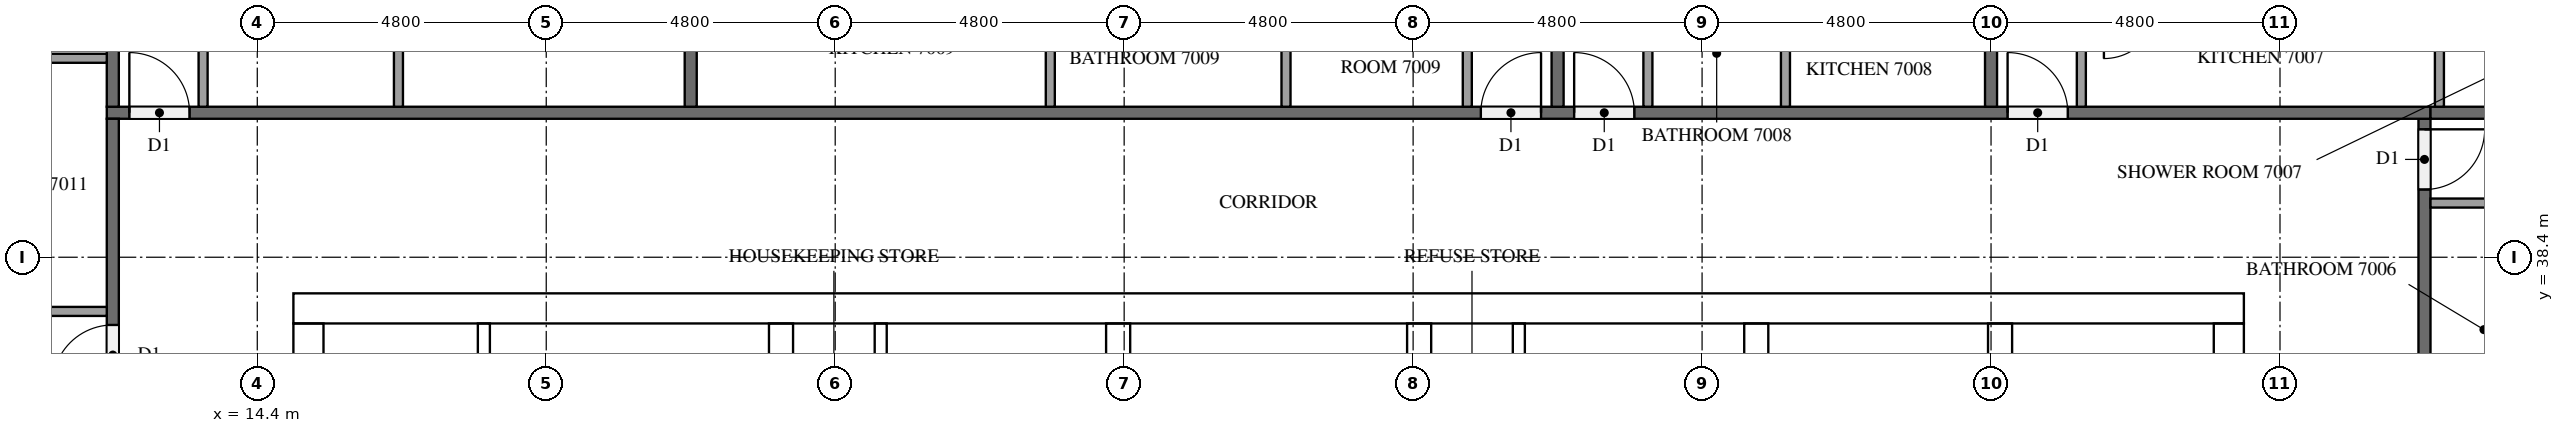
"""IFC4 building model, lengths in metres.
Left out: names, types, materials, properties, quantities, classifications, styles, units other than length and angle.
Written with IfcOpenShell. Run it as: python <this file> out.ifc"""

import sys

from ifc_helpers import new_model, si_unit, direction, frame, frame_2d, origin, place, context, subcontext, project, spatial, rectangle, extrude, element, fill, save


model = new_model("IFC4")
c1 = context("Model", 3, precision=1e-05, world=origin(), true_north=direction((0.0, 1.0)))
c2 = subcontext(c1, "Body", "Model", "MODEL_VIEW")
j1 = project(units=[si_unit("LENGTHUNIT", "METRE"), si_unit("PLANEANGLEUNIT", "RADIAN")], contexts=[c1])
p1 = place(None, origin())
s1 = spatial("IfcSite", under=j1, at=p1, CompositionType="ELEMENT")
p2 = place(p1, origin())
s2 = spatial("IfcBuilding", under=s1, at=p2, CompositionType="ELEMENT")
p3 = place(p2, frame((0.0, 0.0, 268.6)))
s3 = spatial("IfcBuildingStorey", under=s2, at=p3, CompositionType="ELEMENT", Elevation=268.6)
p4 = place(p3, frame((15.0, 37.55, 0.0), z_axis=(0.0, 0.0, 1.0), x_axis=(1.0, 0.0, 0.0)))
e1 = element("IfcWall", 1, at=p4, inside=s3, PredefinedType="SHEAR", context=c2, shape_type="SweptSolid", body=[
    extrude(rectangle(XDim=32.4, YDim=0.5, at=frame_2d((16.2, 0.0))), origin(), (0.0, 0.0, 1.0), 3.2),
])
p5 = place(p4, frame((15.3, 0.0, 0.0)))
e2 = element("IfcOpeningElement", 2, at=p5, cuts=e1, PredefinedType="OPENING", context=c2, shape_type="SweptSolid", body=[
    extrude(rectangle(XDim=1.8, YDim=2.1, at=frame_2d((0.9, 1.05))), frame((0.0, 0.26, 0.0), z_axis=(0.0, -1.0, 0.0), x_axis=(1.0, 0.0, 0.0)), (0.0, 0.0, 1.0), 0.52),
])
p6 = place(p4, frame((1.282, 0.0, 0.0)))
e3 = element("IfcOpeningElement", 3, at=p6, cuts=e1, PredefinedType="OPENING", context=c2, shape_type="SweptSolid", body=[
    extrude(rectangle(XDim=1.0, YDim=2.1, at=frame_2d((0.5, 1.05))), frame((0.0, 0.26, 0.0), z_axis=(0.0, -1.0, 0.0), x_axis=(1.0, 0.0, 0.0)), (0.0, 0.0, 1.0), 0.52),
])
p7 = place(p4, frame((5.082, 0.0, 0.0)))
e4 = element("IfcOpeningElement", 4, at=p7, cuts=e1, PredefinedType="OPENING", context=c2, shape_type="SweptSolid", body=[
    extrude(rectangle(XDim=1.0, YDim=2.1, at=frame_2d((0.5, 1.05))), frame((0.0, 0.26, 0.0), z_axis=(0.0, -1.0, 0.0), x_axis=(1.0, 0.0, 0.0)), (0.0, 0.0, 1.0), 0.52),
])
p8 = place(p3, frame((15.25, 15.5, 0.0), z_axis=(0.0, 0.0, 1.0), x_axis=(0.0, 1.0, 0.0)))
e5 = element("IfcWall", 5, at=p8, inside=s3, PredefinedType="SHEAR", context=c2, shape_type="SweptSolid", body=[
    extrude(rectangle(XDim=21.8, YDim=0.5, at=frame_2d((10.9, 0.0))), origin(), (0.0, 0.0, 1.0), 3.2),
])
p9 = place(p8, frame((5.26, 0.0, 0.0)))
e6 = element("IfcOpeningElement", 6, at=p9, cuts=e5, PredefinedType="OPENING", context=c2, shape_type="SweptSolid", body=[
    extrude(rectangle(XDim=1.2, YDim=2.1, at=frame_2d((0.6, 1.05))), frame((0.0, 0.26, 0.0), z_axis=(0.0, -1.0, 0.0), x_axis=(1.0, 0.0, 0.0)), (0.0, 0.0, 1.0), 0.52),
])
p10 = place(p3, frame((47.15, 15.5, 0.0), z_axis=(0.0, 0.0, 1.0), x_axis=(0.0, 1.0, 0.0)))
e7 = element("IfcWall", 7, at=p10, inside=s3, PredefinedType="SHEAR", context=c2, shape_type="SweptSolid", body=[
    extrude(rectangle(XDim=21.8, YDim=0.5, at=frame_2d((10.9, 0.0))), origin(), (0.0, 0.0, 1.0), 3.2),
])
p11 = place(p10, frame((10.6, 0.0, 0.0)))
e8 = element("IfcOpeningElement", 8, at=p11, cuts=e7, PredefinedType="OPENING", context=c2, shape_type="SweptSolid", body=[
    extrude(rectangle(XDim=1.2, YDim=2.1, at=frame_2d((0.6, 1.05))), frame((0.0, 0.26, 0.0), z_axis=(0.0, -1.0, 0.0), x_axis=(1.0, 0.0, 0.0)), (0.0, 0.0, 1.0), 0.52),
])
p12 = place(p3, frame((23.1, 15.5, 0.0), z_axis=(0.0, 0.0, 1.0), x_axis=(0.0, 1.0, 0.0)))
e9 = element("IfcWall", 9, at=p12, inside=s3, PredefinedType="SHEAR", context=c2, shape_type="SweptSolid", body=[
    extrude(rectangle(XDim=21.8, YDim=0.4, at=frame_2d((10.9, 0.0))), origin(), (0.0, 0.0, 1.0), 3.2),
])
p13 = place(p3, frame((39.3, 27.75, 0.0), z_axis=(0.0, 0.0, 1.0), x_axis=(0.0, 1.0, 0.0)))
e10 = element("IfcWall", 10, at=p13, inside=s3, PredefinedType="SHEAR", context=c2, shape_type="SweptSolid", body=[
    extrude(rectangle(XDim=9.55, YDim=0.4, at=frame_2d((4.775, 0.0))), origin(), (0.0, 0.0, 1.0), 3.2),
])
p14 = place(p3, frame((43.35, 27.75, 0.0), z_axis=(0.0, 0.0, 1.0), x_axis=(0.0, 1.0, 0.0)))
e11 = element("IfcWall", 11, at=p14, inside=s3, PredefinedType="SHEAR", context=c2, shape_type="SweptSolid", body=[
    extrude(rectangle(XDim=9.55, YDim=0.4, at=frame_2d((4.775, 0.0))), origin(), (0.0, 0.0, 1.0), 3.2),
])
p15 = place(p14, frame((7.65, 0.0, 0.0)))
e12 = element("IfcOpeningElement", 12, at=p15, cuts=e11, PredefinedType="OPENING", context=c2, shape_type="SweptSolid", body=[
    extrude(rectangle(XDim=1.2, YDim=2.1, at=frame_2d((0.6, 1.05))), frame((0.0, 0.21, 0.0), z_axis=(0.0, -1.0, 0.0), x_axis=(1.0, 0.0, 0.0)), (0.0, 0.0, 1.0), 0.42),
])
for number, where, z_axis, x_axis in (
    (13, (28.7, 33.75, 0.0), (0.0, 0.0, 1.0), (0.0, 1.0, 0.0)),
    (14, (33.7, 33.75, 0.0), (0.0, 0.0, 1.0), (0.0, 1.0, 0.0)),
):
    element("IfcWall", number, at=place(p3, frame(where, z_axis=z_axis, x_axis=x_axis)), inside=s3, PredefinedType="SHEAR", context=c2, shape_type="SweptSolid", body=[
        extrude(rectangle(XDim=3.55, YDim=0.4, at=frame_2d((1.775, 0.0))), origin(), (0.0, 0.0, 1.0), 3.2),
    ])
p16 = place(p3, frame((18.164, 31.45, 0.0), z_axis=(0.0, 0.0, 1.0), x_axis=(0.0, 1.0, 0.0)))
e15 = element("IfcWall", 15, at=p16, inside=s3, PredefinedType="PARTITIONING", context=c2, shape_type="SweptSolid", body=[
    extrude(rectangle(XDim=5.85, YDim=0.2, at=frame_2d((2.925, 0.0))), origin(), (0.0, 0.0, 1.0), 3.2),
])
for number, where, z_axis, x_axis in (
    (16, (24.756, 33.75, 0.0), (0.0, 0.0, 1.0), (0.0, 1.0, 0.0)),
    (17, (35.356, 33.75, 0.0), (0.0, 0.0, 1.0), (0.0, 1.0, 0.0)),
):
    element("IfcWall", number, at=place(p3, frame(where, z_axis=z_axis, x_axis=x_axis)), inside=s3, PredefinedType="PARTITIONING", context=c2, shape_type="SweptSolid", body=[
        extrude(rectangle(XDim=3.55, YDim=0.2, at=frame_2d((1.775, 0.0))), origin(), (0.0, 0.0, 1.0), 3.2),
    ])
p17 = place(p3, frame((50.4, 40.7, 0.0), z_axis=(0.0, 0.0, 1.0), x_axis=(0.0, -1.0, 0.0)))
e18 = element("IfcWall", 18, at=p17, inside=s3, PredefinedType="PARTITIONING", context=c2, shape_type="SweptSolid", body=[
    extrude(rectangle(XDim=28.6, YDim=0.2, at=frame_2d((14.3, 0.0))), origin(), (0.0, 0.0, 1.0), 3.2),
])
p18 = place(p17, frame((27.425, 0.0, 0.0)))
e19 = element("IfcOpeningElement", 19, at=p18, cuts=e18, PredefinedType="OPENING", context=c2, shape_type="SweptSolid", body=[
    extrude(rectangle(XDim=1.0, YDim=2.1, at=frame_2d((0.5, 1.05))), frame((0.0, 0.11, 0.0), z_axis=(0.0, -1.0, 0.0), x_axis=(1.0, 0.0, 0.0)), (0.0, 0.0, 1.0), 0.22),
])
p19 = place(p17, frame((0.175, 0.0, 0.0)))
e20 = element("IfcOpeningElement", 20, at=p19, cuts=e18, PredefinedType="OPENING", context=c2, shape_type="SweptSolid", body=[
    extrude(rectangle(XDim=1.0, YDim=2.1, at=frame_2d((0.5, 1.05))), frame((0.0, 0.11, 0.0), z_axis=(0.0, -1.0, 0.0), x_axis=(1.0, 0.0, 0.0)), (0.0, 0.0, 1.0), 0.22),
])
p20 = place(p3, frame((11.9, 40.8, 0.0), z_axis=(0.0, 0.0, 1.0), x_axis=(1.0, 0.0, 0.0)))
e21 = element("IfcWall", 21, at=p20, inside=s3, PredefinedType="PARTITIONING", context=c2, shape_type="SweptSolid", body=[
    extrude(rectangle(XDim=38.6, YDim=0.2, at=frame_2d((19.3, 0.0))), origin(), (0.0, 0.0, 1.0), 3.2),
])
p21 = place(p20, frame((31.575, 0.0, 0.0)))
e22 = element("IfcOpeningElement", 22, at=p21, cuts=e21, PredefinedType="OPENING", context=c2, shape_type="SweptSolid", body=[
    extrude(rectangle(XDim=1.0, YDim=2.1, at=frame_2d((0.5, 1.05))), frame((0.0, 0.11, 0.0), z_axis=(0.0, -1.0, 0.0), x_axis=(1.0, 0.0, 0.0)), (0.0, 0.0, 1.0), 0.22),
])
p22 = place(p20, frame((24.375, 0.0, 0.0)))
e23 = element("IfcOpeningElement", 23, at=p22, cuts=e21, PredefinedType="OPENING", context=c2, shape_type="SweptSolid", body=[
    extrude(rectangle(XDim=1.0, YDim=2.1, at=frame_2d((0.5, 1.05))), frame((0.0, 0.11, 0.0), z_axis=(0.0, -1.0, 0.0), x_axis=(1.0, 0.0, 0.0)), (0.0, 0.0, 1.0), 0.22),
])
p23 = place(p20, frame((22.825, 0.0, 0.0)))
e24 = element("IfcOpeningElement", 24, at=p23, cuts=e21, PredefinedType="OPENING", context=c2, shape_type="SweptSolid", body=[
    extrude(rectangle(XDim=1.0, YDim=2.1, at=frame_2d((0.5, 1.05))), frame((0.0, 0.11, 0.0), z_axis=(0.0, -1.0, 0.0), x_axis=(1.0, 0.0, 0.0)), (0.0, 0.0, 1.0), 0.22),
])
p24 = place(p20, frame((0.375, 0.0, 0.0)))
e25 = element("IfcOpeningElement", 25, at=p24, cuts=e21, PredefinedType="OPENING", context=c2, shape_type="SweptSolid", body=[
    extrude(rectangle(XDim=1.0, YDim=2.1, at=frame_2d((0.5, 1.05))), frame((0.0, 0.11, 0.0), z_axis=(0.0, -1.0, 0.0), x_axis=(1.0, 0.0, 0.0)), (0.0, 0.0, 1.0), 0.22),
])
p25 = place(p3, frame((12.0, 12.1, 0.0), z_axis=(0.0, 0.0, 1.0), x_axis=(0.0, 1.0, 0.0)))
e26 = element("IfcWall", 26, at=p25, inside=s3, PredefinedType="PARTITIONING", context=c2, shape_type="SweptSolid", body=[
    extrude(rectangle(XDim=28.6, YDim=0.2, at=frame_2d((14.3, 0.0))), origin(), (0.0, 0.0, 1.0), 3.2),
])
p26 = place(p25, frame((24.175, 0.0, 0.0)))
e27 = element("IfcOpeningElement", 27, at=p26, cuts=e26, PredefinedType="OPENING", context=c2, shape_type="SweptSolid", body=[
    extrude(rectangle(XDim=1.0, YDim=2.1, at=frame_2d((0.5, 1.05))), frame((0.0, 0.11, 0.0), z_axis=(0.0, -1.0, 0.0), x_axis=(1.0, 0.0, 0.0)), (0.0, 0.0, 1.0), 0.22),
])
p27 = place(p25, frame((14.575, 0.0, 0.0)))
e28 = element("IfcOpeningElement", 28, at=p27, cuts=e26, PredefinedType="OPENING", context=c2, shape_type="SweptSolid", body=[
    extrude(rectangle(XDim=1.0, YDim=2.1, at=frame_2d((0.5, 1.05))), frame((0.0, 0.11, 0.0), z_axis=(0.0, -1.0, 0.0), x_axis=(1.0, 0.0, 0.0)), (0.0, 0.0, 1.0), 0.22),
])
p28 = place(p25, frame((0.175, 0.0, 0.0)))
e29 = element("IfcOpeningElement", 29, at=p28, cuts=e26, PredefinedType="OPENING", context=c2, shape_type="SweptSolid", body=[
    extrude(rectangle(XDim=1.0, YDim=2.1, at=frame_2d((0.5, 1.05))), frame((0.0, 0.11, 0.0), z_axis=(0.0, -1.0, 0.0), x_axis=(1.0, 0.0, 0.0)), (0.0, 0.0, 1.0), 0.22),
])
p29 = place(p3, frame((50.5, 40.8, 0.0), z_axis=(0.0, 0.0, 1.0), x_axis=(1.0, 0.0, 0.0)))
e30 = element("IfcWall", 30, at=p29, inside=s3, PredefinedType="PARTITIONING", context=c2, shape_type="SweptSolid", body=[
    extrude(rectangle(XDim=7.0, YDim=0.2, at=frame_2d((3.5, 0.0))), origin(), (0.0, 0.0, 1.0), 3.2),
])
p30 = place(p3, frame((43.2, 47.75, 0.0), z_axis=(0.0, 0.0, 1.0), x_axis=(0.0, -1.0, 0.0)))
e31 = element("IfcWall", 31, at=p30, inside=s3, PredefinedType="PARTITIONING", context=c2, shape_type="SweptSolid", body=[
    extrude(rectangle(XDim=6.85, YDim=0.2, at=frame_2d((3.425, 0.0))), origin(), (0.0, 0.0, 1.0), 3.2),
])
for number, where, z_axis, x_axis in (
    (32, (36.0, 47.9, 0.0), (0.0, 0.0, 1.0), (0.0, -1.0, 0.0)),
    (33, (21.6, 47.9, 0.0), (0.0, 0.0, 1.0), (0.0, -1.0, 0.0)),
    (34, (12.0, 47.9, 0.0), (0.0, 0.0, 1.0), (0.0, -1.0, 0.0)),
):
    element("IfcWall", number, at=place(p3, frame(where, z_axis=z_axis, x_axis=x_axis)), inside=s3, PredefinedType="PARTITIONING", context=c2, shape_type="SweptSolid", body=[
        extrude(rectangle(XDim=7.0, YDim=0.2, at=frame_2d((3.5, 0.0))), origin(), (0.0, 0.0, 1.0), 3.2),
    ])
p31 = place(p3, frame((50.5, 39.3, 0.0), z_axis=(0.0, 0.0, 1.0), x_axis=(1.0, 0.0, 0.0)))
e35 = element("IfcWall", 35, at=p31, inside=s3, PredefinedType="PARTITIONING", context=c2, shape_type="SweptSolid", body=[
    extrude(rectangle(XDim=1.925, YDim=0.15, at=frame_2d((0.962, 0.0))), origin(), (0.0, 0.0, 1.0), 3.2),
])
p32 = place(p3, frame((50.648, 40.9, 0.0), z_axis=(0.0, 0.0, 1.0), x_axis=(0.0, 1.0, 0.0)))
e36 = element("IfcWall", 36, at=p32, inside=s3, PredefinedType="PARTITIONING", context=c2, shape_type="SweptSolid", body=[
    extrude(rectangle(XDim=1.625, YDim=0.15, at=frame_2d((0.812, 0.0))), origin(), (0.0, 0.0, 1.0), 3.2),
])
for number, where, z_axis, x_axis in (
    (37, (44.7, 40.9, 0.0), (0.0, 0.0, 1.0), (0.0, 1.0, 0.0)),
    (38, (39.785, 40.9, 0.0), (0.0, 0.0, 1.0), (0.0, 1.0, 0.0)),
):
    element("IfcWall", number, at=place(p3, frame(where, z_axis=z_axis, x_axis=x_axis)), inside=s3, PredefinedType="PARTITIONING", context=c2, shape_type="SweptSolid", body=[
        extrude(rectangle(XDim=1.775, YDim=0.15, at=frame_2d((0.888, 0.0))), origin(), (0.0, 0.0, 1.0), 3.2),
    ])
p33 = place(p3, frame((37.5, 40.9, 0.0), z_axis=(0.0, 0.0, 1.0), x_axis=(0.0, 1.0, 0.0)))
e39 = element("IfcWall", 39, at=p33, inside=s3, PredefinedType="PARTITIONING", context=c2, shape_type="SweptSolid", body=[
    extrude(rectangle(XDim=1.925, YDim=0.15, at=frame_2d((0.962, 0.0))), origin(), (0.0, 0.0, 1.0), 3.2),
])
for number, where, z_axis, x_axis in (
    (40, (31.489, 40.9, 0.0), (0.0, 0.0, 1.0), (0.0, 1.0, 0.0)),
    (41, (27.573, 40.9, 0.0), (0.0, 0.0, 1.0), (0.0, 1.0, 0.0)),
):
    element("IfcWall", number, at=place(p3, frame(where, z_axis=z_axis, x_axis=x_axis)), inside=s3, PredefinedType="PARTITIONING", context=c2, shape_type="SweptSolid", body=[
        extrude(rectangle(XDim=2.075, YDim=0.15, at=frame_2d((1.038, 0.0))), origin(), (0.0, 0.0, 1.0), 3.2),
    ])
p34 = place(p3, frame((34.5, 40.9, 0.0), z_axis=(0.0, 0.0, 1.0), x_axis=(0.0, 1.0, 0.0)))
e42 = element("IfcWall", 42, at=p34, inside=s3, PredefinedType="PARTITIONING", context=c2, shape_type="SweptSolid", body=[
    extrude(rectangle(XDim=2.225, YDim=0.15, at=frame_2d((1.113, 0.0))), origin(), (0.0, 0.0, 1.0), 3.2),
])
p35 = place(p3, frame((16.745, 40.9, 0.0), z_axis=(0.0, 0.0, 1.0), x_axis=(0.0, 1.0, 0.0)))
e43 = element("IfcWall", 43, at=p35, inside=s3, PredefinedType="PARTITIONING", context=c2, shape_type="SweptSolid", body=[
    extrude(rectangle(XDim=2.075, YDim=0.15, at=frame_2d((1.038, 0.0))), origin(), (0.0, 0.0, 1.0), 3.2),
])
p36 = place(p3, frame((13.5, 40.9, 0.0), z_axis=(0.0, 0.0, 1.0), x_axis=(0.0, 1.0, 0.0)))
e44 = element("IfcWall", 44, at=p36, inside=s3, PredefinedType="PARTITIONING", context=c2, shape_type="SweptSolid", body=[
    extrude(rectangle(XDim=2.225, YDim=0.15, at=frame_2d((1.113, 0.0))), origin(), (0.0, 0.0, 1.0), 3.2),
])
p37 = place(p3, frame((11.9, 41.705, 0.0), z_axis=(0.0, 0.0, 1.0), x_axis=(-1.0, 0.0, 0.0)))
e45 = element("IfcWall", 45, at=p37, inside=s3, PredefinedType="PARTITIONING", context=c2, shape_type="SweptSolid", body=[
    extrude(rectangle(XDim=3.125, YDim=0.15, at=frame_2d((1.562, 0.0))), origin(), (0.0, 0.0, 1.0), 3.2),
])
p38 = place(p3, frame((11.9, 37.5, 0.0), z_axis=(0.0, 0.0, 1.0), x_axis=(-1.0, 0.0, 0.0)))
e46 = element("IfcWall", 46, at=p38, inside=s3, PredefinedType="PARTITIONING", context=c2, shape_type="SweptSolid", body=[
    extrude(rectangle(XDim=3.275, YDim=0.15, at=frame_2d((1.637, 0.0))), origin(), (0.0, 0.0, 1.0), 3.2),
])
p39 = place(p5, origin())
e47 = element("IfcDoor", 47, at=p39, inside=s3, OperationType="DOUBLE_DOOR_SINGLE_SWING", PredefinedType="DOOR", context=c2, shape_type="SweptSolid", body=[
    extrude(rectangle(XDim=1.8, YDim=2.1, at=frame_2d((0.9, 1.05))), frame((0.0, 0.025, 0.0), z_axis=(0.0, -1.0, 0.0), x_axis=(1.0, 0.0, 0.0)), (0.0, 0.0, 1.0), 0.05),
])
fill(e2, e47)
p40 = place(p6, origin())
e48 = element("IfcDoor", 48, at=p40, inside=s3, OperationType="SINGLE_SWING_LEFT", PredefinedType="DOOR", context=c2, shape_type="SweptSolid", body=[
    extrude(rectangle(XDim=1.0, YDim=2.1, at=frame_2d((0.5, 1.05))), frame((0.0, 0.025, 0.0), z_axis=(0.0, -1.0, 0.0), x_axis=(1.0, 0.0, 0.0)), (0.0, 0.0, 1.0), 0.05),
])
fill(e3, e48)
p41 = place(p7, origin())
e49 = element("IfcDoor", 49, at=p41, inside=s3, OperationType="SINGLE_SWING_RIGHT", PredefinedType="DOOR", context=c2, shape_type="SweptSolid", body=[
    extrude(rectangle(XDim=1.0, YDim=2.1, at=frame_2d((0.5, 1.05))), frame((0.0, 0.025, 0.0), z_axis=(0.0, -1.0, 0.0), x_axis=(1.0, 0.0, 0.0)), (0.0, 0.0, 1.0), 0.05),
])
fill(e4, e49)
p42 = place(p19, origin())
e50 = element("IfcDoor", 50, at=p42, inside=s3, OperationType="SINGLE_SWING_LEFT", PredefinedType="DOOR", context=c2, shape_type="SweptSolid", body=[
    extrude(rectangle(XDim=1.0, YDim=2.1, at=frame_2d((0.5, 1.05))), frame((0.0, 0.025, 0.0), z_axis=(0.0, -1.0, 0.0), x_axis=(1.0, 0.0, 0.0)), (0.0, 0.0, 1.0), 0.05),
])
fill(e20, e50)
p43 = place(p21, origin())
e51 = element("IfcDoor", 51, at=p43, inside=s3, OperationType="SINGLE_SWING_LEFT", PredefinedType="DOOR", context=c2, shape_type="SweptSolid", body=[
    extrude(rectangle(XDim=1.0, YDim=2.1, at=frame_2d((0.5, 1.05))), frame((0.0, 0.025, 0.0), z_axis=(0.0, -1.0, 0.0), x_axis=(1.0, 0.0, 0.0)), (0.0, 0.0, 1.0), 0.05),
])
fill(e22, e51)
p44 = place(p22, origin())
e52 = element("IfcDoor", 52, at=p44, inside=s3, OperationType="SINGLE_SWING_LEFT", PredefinedType="DOOR", context=c2, shape_type="SweptSolid", body=[
    extrude(rectangle(XDim=1.0, YDim=2.1, at=frame_2d((0.5, 1.05))), frame((0.0, 0.025, 0.0), z_axis=(0.0, -1.0, 0.0), x_axis=(1.0, 0.0, 0.0)), (0.0, 0.0, 1.0), 0.05),
])
fill(e23, e52)
p45 = place(p23, origin())
e53 = element("IfcDoor", 53, at=p45, inside=s3, OperationType="SINGLE_SWING_RIGHT", PredefinedType="DOOR", context=c2, shape_type="SweptSolid", body=[
    extrude(rectangle(XDim=1.0, YDim=2.1, at=frame_2d((0.5, 1.05))), frame((0.0, 0.025, 0.0), z_axis=(0.0, -1.0, 0.0), x_axis=(1.0, 0.0, 0.0)), (0.0, 0.0, 1.0), 0.05),
])
fill(e24, e53)
p46 = place(p24, origin())
e54 = element("IfcDoor", 54, at=p46, inside=s3, OperationType="SINGLE_SWING_LEFT", PredefinedType="DOOR", context=c2, shape_type="SweptSolid", body=[
    extrude(rectangle(XDim=1.0, YDim=2.1, at=frame_2d((0.5, 1.05))), frame((0.0, 0.025, 0.0), z_axis=(0.0, -1.0, 0.0), x_axis=(1.0, 0.0, 0.0)), (0.0, 0.0, 1.0), 0.05),
])
fill(e25, e54)
p47 = place(p26, origin())
e55 = element("IfcDoor", 55, at=p47, inside=s3, OperationType="SINGLE_SWING_LEFT", PredefinedType="DOOR", context=c2, shape_type="SweptSolid", body=[
    extrude(rectangle(XDim=1.0, YDim=2.1, at=frame_2d((0.5, 1.05))), frame((0.0, 0.025, 0.0), z_axis=(0.0, -1.0, 0.0), x_axis=(1.0, 0.0, 0.0)), (0.0, 0.0, 1.0), 0.05),
])
fill(e27, e55)
save(model, sys.argv[1])
